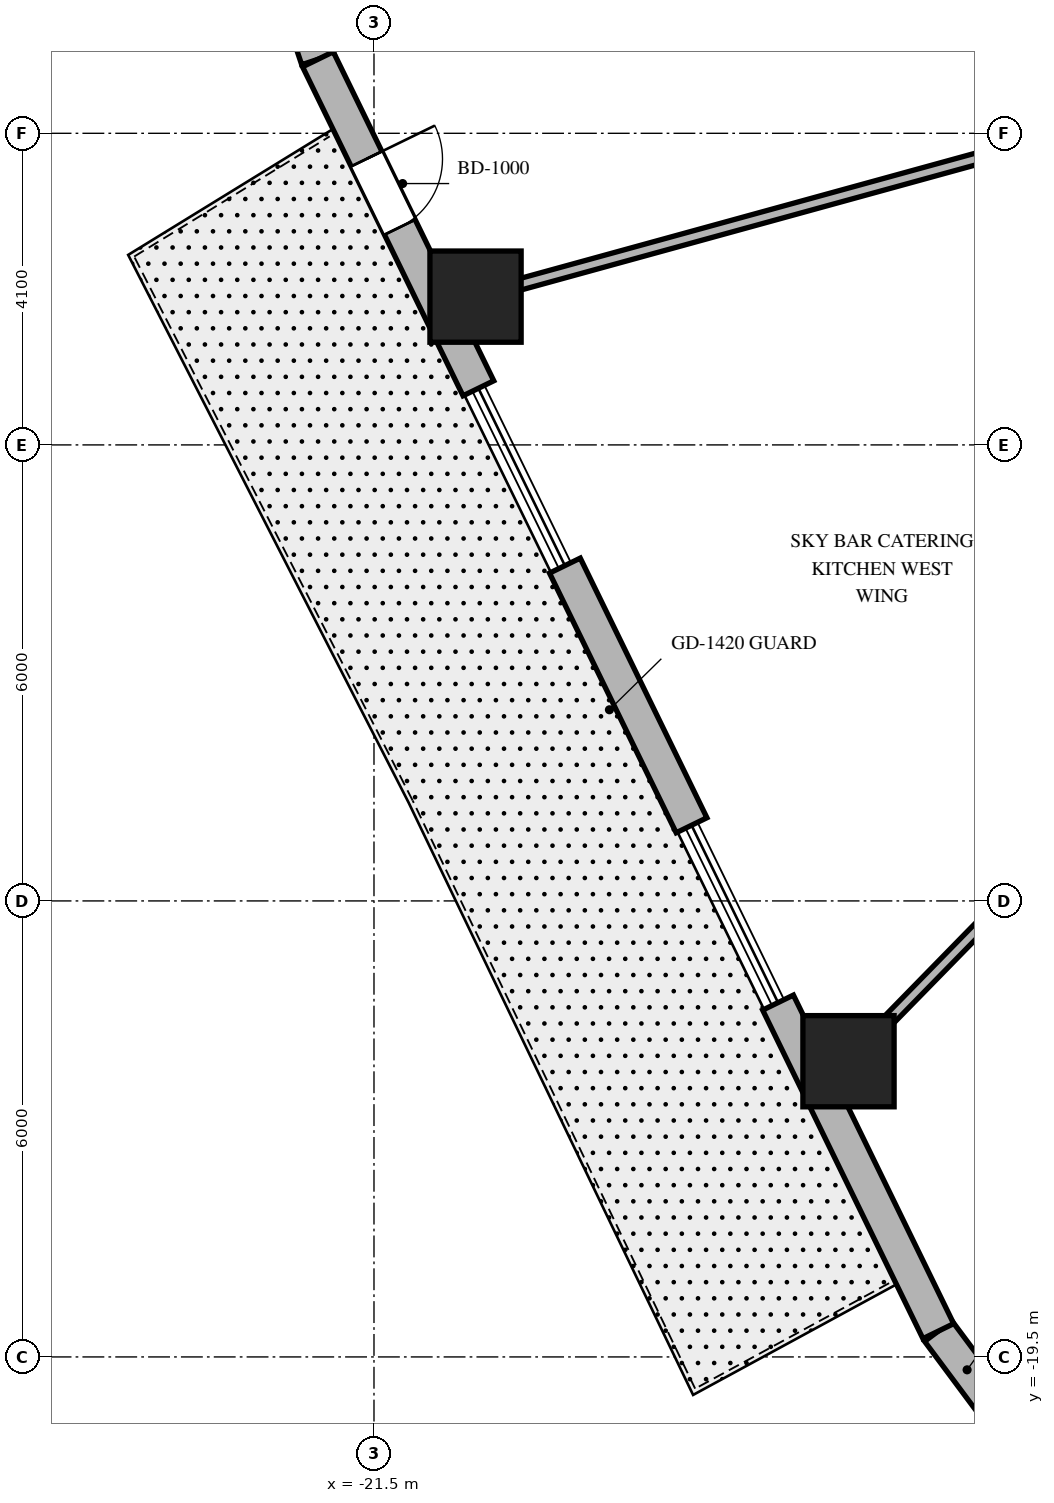
"""IFC4 building model, lengths in metres.
Left out: names, types, materials, properties, quantities, classifications, styles, units other than length and angle.
Written with IfcOpenShell. Run it as: python <this file> out.ifc"""

import sys

from ifc_helpers import new_model, si_unit, direction, frame, frame_2d, origin, origin_2d, place, context, subcontext, project, spatial, rectangle, extrude, element, fill, save


model = new_model("IFC4")
c1 = context("Model", 3, precision=1e-05, world=origin(), true_north=direction((0.0, 1.0)))
c2 = subcontext(c1, "Body", "Model", "MODEL_VIEW")
j1 = project(units=[si_unit("LENGTHUNIT", "METRE"), si_unit("PLANEANGLEUNIT", "RADIAN")], contexts=[c1])
p1 = place(None, origin())
s1 = spatial("IfcSite", under=j1, at=p1, CompositionType="ELEMENT")
p2 = place(p1, origin())
s2 = spatial("IfcBuilding", under=s1, at=p2, CompositionType="ELEMENT")
p3 = place(p2, frame((0.0, 0.0, 139.5)))
s3 = spatial("IfcBuildingStorey", under=s2, at=p3, CompositionType="ELEMENT", Elevation=139.5)
for number, where, z_axis, x_axis in (
    (1, (-20.164, -5.549, 0.0), (0.0, 0.0, 1.0), (1.0, 0.0, 0.0)),
    (2, (-15.257, -15.609, 0.0), (0.0, 0.0, 1.0), (1.0, 0.0, 0.0)),
):
    element("IfcColumn", number, at=place(p3, frame(where, z_axis=z_axis, x_axis=x_axis)), inside=s3, PredefinedType="COLUMN", context=c2, shape_type="SweptSolid", body=[
        extrude(rectangle(XDim=1.2, YDim=1.2, at=origin_2d()), origin(), (0.0, 0.0, 1.0), 4.8),
    ])
p4 = place(p3, frame((-14.076, -19.161, 0.0), z_axis=(0.0, 0.0, 1.0), x_axis=(0.597226657159, -0.802072515412, 0.0)))
e3 = element("IfcWall", 3, at=p4, inside=s3, PredefinedType="SOLIDWALL", context=c2, shape_type="SweptSolid", body=[
    extrude(rectangle(XDim=1.269, YDim=0.45, at=frame_2d((0.635, 0.0))), origin(), (0.0, 0.0, 1.0), 4.5),
])
p5 = place(p3, frame((-22.522, -1.577, 0.0), z_axis=(0.0, 0.0, 1.0), x_axis=(0.317372694837, -0.948300887151, 0.0)))
e4 = element("IfcWall", 4, at=p5, inside=s3, PredefinedType="SOLIDWALL", context=c2, shape_type="SweptSolid", body=[
    extrude(rectangle(XDim=0.896, YDim=0.45, at=frame_2d((0.448, 0.0))), origin(), (0.0, 0.0, 1.0), 4.5),
])
p6 = place(p3, frame((-22.238, -2.427, 0.0), z_axis=(0.0, 0.0, 1.0), x_axis=(0.438370693728, -0.898794267272, 0.0)))
e5 = element("IfcWall", 5, at=p6, inside=s3, PredefinedType="SOLIDWALL", context=c2, shape_type="SweptSolid", body=[
    extrude(rectangle(XDim=4.816, YDim=0.45, at=frame_2d((2.408, 0.0))), origin(), (0.0, 0.0, 1.0), 4.5),
])
p7 = place(p6, frame((1.458, 0.0, 0.0)))
e6 = element("IfcOpeningElement", 6, at=p7, cuts=e5, PredefinedType="OPENING", context=c2, shape_type="SweptSolid", body=[
    extrude(rectangle(XDim=1.0, YDim=2.15, at=frame_2d((0.5, 1.075))), frame((0.0, 0.235, 0.0), z_axis=(0.0, -1.0, 0.0), x_axis=(1.0, 0.0, 0.0)), (0.0, 0.0, 1.0), 0.47),
])
p8 = place(p3, frame((-18.988, -9.088, 0.0), z_axis=(0.0, 0.0, 1.0), x_axis=(0.43837933929, -0.898790050503, 0.0)))
e7 = element("IfcWall", 7, at=p8, inside=s3, PredefinedType="SOLIDWALL", context=c2, shape_type="SweptSolid", body=[
    extrude(rectangle(XDim=3.801, YDim=0.45, at=frame_2d((1.9, 0.0))), origin(), (0.0, 0.0, 1.0), 4.5),
])
p9 = place(p3, frame((-16.184, -14.838, 0.0), z_axis=(0.0, 0.0, 1.0), x_axis=(0.43837962648, -0.898789910428, 0.0)))
e8 = element("IfcWall", 8, at=p9, inside=s3, PredefinedType="SOLIDWALL", context=c2, shape_type="SweptSolid", body=[
    extrude(rectangle(XDim=4.81, YDim=0.45, at=frame_2d((2.405, 0.0))), origin(), (0.0, 0.0, 1.0), 4.5),
])
p10 = place(p3, frame((-11.35, -3.123, 0.0), z_axis=(0.0, 0.0, 1.0), x_axis=(-0.964151983214, -0.265350623261, 0.0)))
e9 = element("IfcWall", 9, at=p10, inside=s3, PredefinedType="PARTITIONING", context=c2, shape_type="SweptSolid", body=[
    extrude(rectangle(XDim=9.645, YDim=0.15, at=frame_2d((4.823, 0.0))), origin(), (0.0, 0.0, 1.0), 2.69),
])
p11 = place(p3, frame((-9.628, -9.85, 0.0), z_axis=(0.0, 0.0, 1.0), x_axis=(-0.698992824326, -0.715128681805, 0.0)))
e10 = element("IfcWall", 10, at=p11, inside=s3, PredefinedType="PARTITIONING", context=c2, shape_type="SweptSolid", body=[
    extrude(rectangle(XDim=8.579, YDim=0.15, at=frame_2d((4.29, 0.0))), origin(), (0.0, 0.0, 1.0), 2.69),
])
p12 = place(p7, origin())
e11 = element("IfcDoor", 11, at=p12, inside=s3, OperationType="SINGLE_SWING_LEFT", PredefinedType="DOOR", context=c2, shape_type="SweptSolid", body=[
    extrude(rectangle(XDim=1.0, YDim=2.15, at=frame_2d((0.5, 1.075))), frame((0.0, 0.025, 0.0), z_axis=(0.0, -1.0, 0.0), x_axis=(1.0, 0.0, 0.0)), (0.0, 0.0, 1.0), 0.05),
])
fill(e6, e11)
save(model, sys.argv[1])
